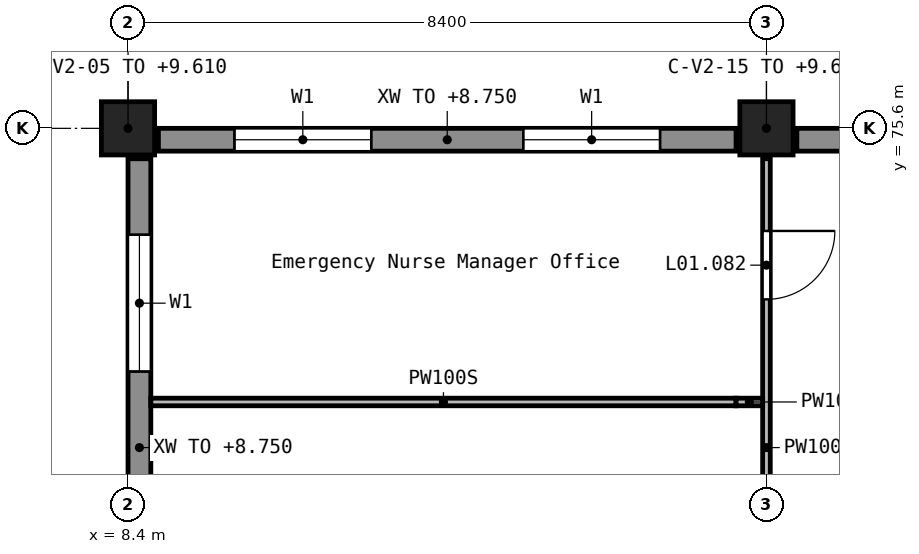
"""IFC4 building model, lengths in metres.
Left out: names, types, materials, properties, quantities, classifications, styles, units other than length and angle.
Written with IfcOpenShell. Run it as: python <this file> out.ifc"""

import sys

from ifc_helpers import new_model, si_unit, direction, frame, frame_2d, origin, origin_2d, place, context, subcontext, project, spatial, rectangle, extrude, element, fill, save


model = new_model("IFC4")
c1 = context("Model", 3, precision=1e-05, world=origin(), true_north=direction((0.0, 1.0)))
c2 = subcontext(c1, "Body", "Model", "MODEL_VIEW")
j1 = project(units=[si_unit("LENGTHUNIT", "METRE"), si_unit("PLANEANGLEUNIT", "RADIAN")], contexts=[c1])
p1 = place(None, origin())
s1 = spatial("IfcSite", under=j1, at=p1, CompositionType="ELEMENT")
p2 = place(p1, origin())
s2 = spatial("IfcBuilding", under=s1, at=p2, CompositionType="ELEMENT")
p3 = place(p2, frame((0.0, 0.0, 5.4)))
s3 = spatial("IfcBuildingStorey", under=s2, at=p3, CompositionType="ELEMENT", Elevation=5.4)
for number, where, z_axis, x_axis in (
    (1, (8.4, 75.6, 0.0), (0.0, 0.0, 1.0), (1.0, 0.0, 0.0)),
    (2, (16.8, 75.6, 0.0), (0.0, 0.0, 1.0), (1.0, 0.0, 0.0)),
):
    element("IfcColumn", number, at=place(p3, frame(where, z_axis=z_axis, x_axis=x_axis)), inside=s3, PredefinedType="COLUMN", context=c2, shape_type="SweptSolid", body=[
        extrude(rectangle(XDim=0.7, YDim=0.7, at=origin_2d()), origin(), (0.0, 0.0, 1.0), 4.21),
    ])
p4 = place(p3, frame((24.8, 75.45, 0.0), z_axis=(0.0, 0.0, 1.0), x_axis=(-1.0, 0.0, 0.0)))
e3 = element("IfcWall", 3, at=p4, inside=s3, PredefinedType="STANDARD", context=c2, shape_type="SweptSolid", body=[
    extrude(rectangle(XDim=7.6, YDim=0.3, at=frame_2d((3.8, 0.0))), origin(), (0.0, 0.0, 1.0), 3.35),
])
p5 = place(p4, frame((1.0, 0.0, 0.9)))
e4 = element("IfcOpeningElement", 4, at=p5, cuts=e3, PredefinedType="OPENING", context=c2, shape_type="SweptSolid", body=[
    extrude(rectangle(XDim=1.8, YDim=1.5, at=frame_2d((0.9, 0.75))), frame((0.0, 0.16, 0.0), z_axis=(0.0, -1.0, 0.0), x_axis=(1.0, 0.0, 0.0)), (0.0, 0.0, 1.0), 0.32),
])
p6 = place(p4, frame((5.2, 0.0, 0.9)))
e5 = element("IfcOpeningElement", 5, at=p6, cuts=e3, PredefinedType="OPENING", context=c2, shape_type="SweptSolid", body=[
    extrude(rectangle(XDim=1.8, YDim=1.5, at=frame_2d((0.9, 0.75))), frame((0.0, 0.16, 0.0), z_axis=(0.0, -1.0, 0.0), x_axis=(1.0, 0.0, 0.0)), (0.0, 0.0, 1.0), 0.32),
])
p7 = place(p3, frame((16.4, 75.45, 0.0), z_axis=(0.0, 0.0, 1.0), x_axis=(-1.0, 0.0, 0.0)))
e6 = element("IfcWall", 6, at=p7, inside=s3, PredefinedType="STANDARD", context=c2, shape_type="SweptSolid", body=[
    extrude(rectangle(XDim=7.6, YDim=0.3, at=frame_2d((3.8, 0.0))), origin(), (0.0, 0.0, 1.0), 3.35),
])
p8 = place(p7, frame((1.0, 0.0, 0.9)))
e7 = element("IfcOpeningElement", 7, at=p8, cuts=e6, PredefinedType="OPENING", context=c2, shape_type="SweptSolid", body=[
    extrude(rectangle(XDim=1.8, YDim=1.5, at=frame_2d((0.9, 0.75))), frame((0.0, 0.16, 0.0), z_axis=(0.0, -1.0, 0.0), x_axis=(1.0, 0.0, 0.0)), (0.0, 0.0, 1.0), 0.32),
])
p9 = place(p7, frame((4.8, 0.0, 0.9)))
e8 = element("IfcOpeningElement", 8, at=p9, cuts=e6, PredefinedType="OPENING", context=c2, shape_type="SweptSolid", body=[
    extrude(rectangle(XDim=1.8, YDim=1.5, at=frame_2d((0.9, 0.75))), frame((0.0, 0.16, 0.0), z_axis=(0.0, -1.0, 0.0), x_axis=(1.0, 0.0, 0.0)), (0.0, 0.0, 1.0), 0.32),
])
p10 = place(p3, frame((8.55, 75.2, 0.0), z_axis=(0.0, 0.0, 1.0), x_axis=(0.0, -1.0, 0.0)))
e9 = element("IfcWall", 9, at=p10, inside=s3, PredefinedType="STANDARD", context=c2, shape_type="SweptSolid", body=[
    extrude(rectangle(XDim=7.6, YDim=0.3, at=frame_2d((3.8, 0.0))), origin(), (0.0, 0.0, 1.0), 3.35),
])
p11 = place(p10, frame((1.0, 0.0, 0.9)))
e10 = element("IfcOpeningElement", 10, at=p11, cuts=e9, PredefinedType="OPENING", context=c2, shape_type="SweptSolid", body=[
    extrude(rectangle(XDim=1.8, YDim=1.5, at=frame_2d((0.9, 0.75))), frame((0.0, 0.16, 0.0), z_axis=(0.0, -1.0, 0.0), x_axis=(1.0, 0.0, 0.0)), (0.0, 0.0, 1.0), 0.32),
])
p12 = place(p10, frame((4.8, 0.0, 0.9)))
e11 = element("IfcOpeningElement", 11, at=p12, cuts=e9, PredefinedType="OPENING", context=c2, shape_type="SweptSolid", body=[
    extrude(rectangle(XDim=1.8, YDim=1.5, at=frame_2d((0.9, 0.75))), frame((0.0, 0.16, 0.0), z_axis=(0.0, -1.0, 0.0), x_axis=(1.0, 0.0, 0.0)), (0.0, 0.0, 1.0), 0.32),
])
p13 = place(p3, frame((16.8, 75.2, 0.0), z_axis=(0.0, 0.0, 1.0), x_axis=(0.0, -1.0, 0.0)))
e12 = element("IfcWall", 12, at=p13, inside=s3, PredefinedType="PARTITIONING", context=c2, shape_type="SweptSolid", body=[
    extrude(rectangle(XDim=7.6, YDim=0.1, at=frame_2d((3.8, 0.0))), origin(), (0.0, 0.0, 1.0), 3.647),
])
p14 = place(p13, frame((4.55, 0.0, 0.0)))
e13 = element("IfcOpeningElement", 13, at=p14, cuts=e12, PredefinedType="OPENING", context=c2, shape_type="SweptSolid", body=[
    extrude(rectangle(XDim=0.9, YDim=2.1, at=frame_2d((0.45, 1.05))), frame((0.0, 0.06, 0.0), z_axis=(0.0, -1.0, 0.0), x_axis=(1.0, 0.0, 0.0)), (0.0, 0.0, 1.0), 0.12),
])
p15 = place(p13, frame((0.95, 0.0, 0.0)))
e14 = element("IfcOpeningElement", 14, at=p15, cuts=e12, PredefinedType="OPENING", context=c2, shape_type="SweptSolid", body=[
    extrude(rectangle(XDim=0.9, YDim=2.1, at=frame_2d((0.45, 1.05))), frame((0.0, 0.06, 0.0), z_axis=(0.0, -1.0, 0.0), x_axis=(1.0, 0.0, 0.0)), (0.0, 0.0, 1.0), 0.12),
])
p16 = place(p3, frame((8.7, 72.0, 0.0), z_axis=(0.0, 0.0, 1.0), x_axis=(1.0, 0.0, 0.0)))
e15 = element("IfcWall", 15, at=p16, inside=s3, PredefinedType="PARTITIONING", context=c2, shape_type="SweptSolid", body=[
    extrude(rectangle(XDim=7.7, YDim=0.1, at=frame_2d((3.85, 0.0))), origin(), (0.0, 0.0, 1.0), 4.15),
])
p17 = place(p3, frame((16.4, 72.0, 0.0), z_axis=(0.0, 0.0, 1.0), x_axis=(1.0, 0.0, 0.0)))
e16 = element("IfcWall", 16, at=p17, inside=s3, PredefinedType="PARTITIONING", context=c2, shape_type="SweptSolid", body=[
    extrude(rectangle(XDim=0.35, YDim=0.1, at=frame_2d((0.175, 0.0))), origin(), (0.0, 0.0, 1.0), 3.647),
])
p18 = place(p8, origin())
e17 = element("IfcWindow", 17, at=p18, inside=s3, PartitioningType="SINGLE_PANEL", PredefinedType="WINDOW", context=c2, shape_type="SweptSolid", body=[
    extrude(rectangle(XDim=1.8, YDim=1.5, at=frame_2d((0.9, 0.75))), frame((0.0, 0.03, 0.0), z_axis=(0.0, -1.0, 0.0), x_axis=(1.0, 0.0, 0.0)), (0.0, 0.0, 1.0), 0.06),
])
fill(e7, e17)
p19 = place(p9, origin())
e18 = element("IfcWindow", 18, at=p19, inside=s3, PartitioningType="SINGLE_PANEL", PredefinedType="WINDOW", context=c2, shape_type="SweptSolid", body=[
    extrude(rectangle(XDim=1.8, YDim=1.5, at=frame_2d((0.9, 0.75))), frame((0.0, 0.03, 0.0), z_axis=(0.0, -1.0, 0.0), x_axis=(1.0, 0.0, 0.0)), (0.0, 0.0, 1.0), 0.06),
])
fill(e8, e18)
p20 = place(p11, origin())
e19 = element("IfcWindow", 19, at=p20, inside=s3, PartitioningType="SINGLE_PANEL", PredefinedType="WINDOW", context=c2, shape_type="SweptSolid", body=[
    extrude(rectangle(XDim=1.8, YDim=1.5, at=frame_2d((0.9, 0.75))), frame((0.0, 0.03, 0.0), z_axis=(0.0, -1.0, 0.0), x_axis=(1.0, 0.0, 0.0)), (0.0, 0.0, 1.0), 0.06),
])
fill(e10, e19)
p21 = place(p15, frame((0.9, 0.0, 0.0), z_axis=(0.0, 0.0, 1.0), x_axis=(-1.0, 0.0, 0.0)))
e20 = element("IfcDoor", 20, at=p21, inside=s3, OperationType="SINGLE_SWING_RIGHT", PredefinedType="DOOR", context=c2, shape_type="SweptSolid", body=[
    extrude(rectangle(XDim=0.9, YDim=2.1, at=frame_2d((0.45, 1.05))), frame((0.0, 0.025, 0.0), z_axis=(0.0, -1.0, 0.0), x_axis=(1.0, 0.0, 0.0)), (0.0, 0.0, 1.0), 0.05),
])
fill(e14, e20)
save(model, sys.argv[1])
